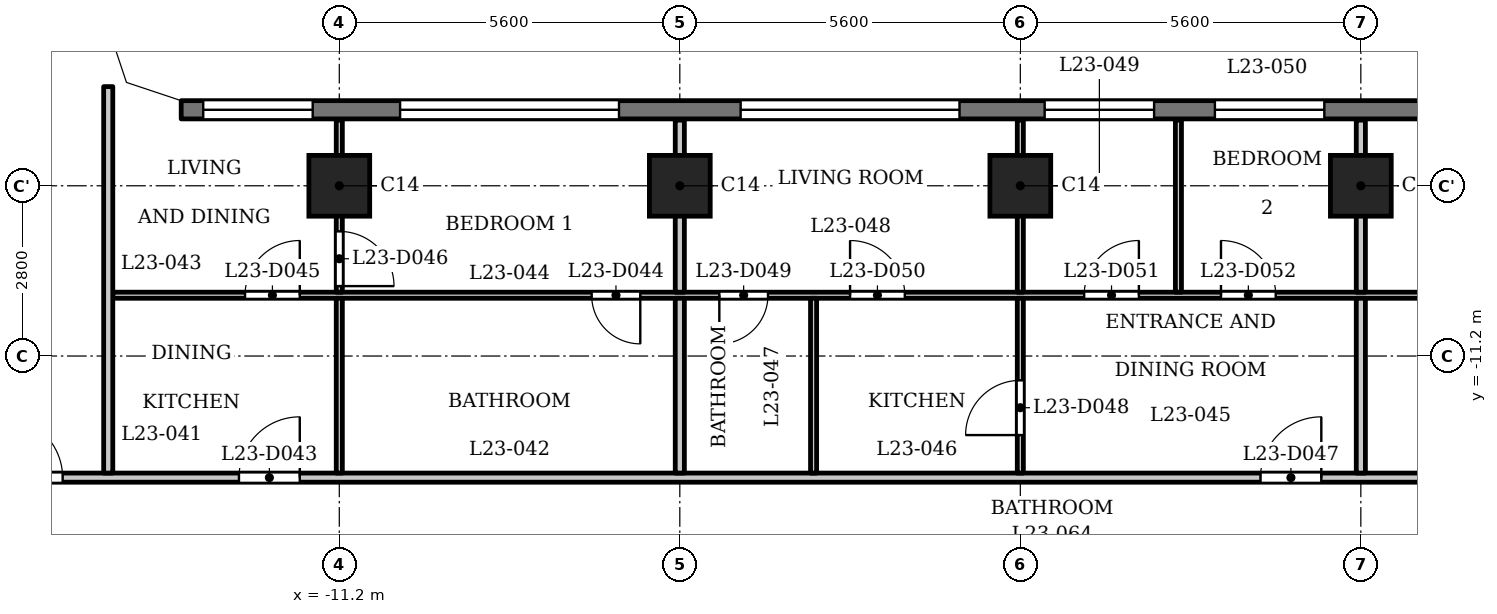
"""IFC4 building model, lengths in metres.
Left out: names, types, materials, properties, quantities, classifications, styles, units other than length and angle.
Written with IfcOpenShell. Run it as: python <this file> out.ifc"""

import sys

from ifc_helpers import new_model, si_unit, direction, frame, frame_2d, origin, origin_2d, place, context, subcontext, project, spatial, polyline, rectangle, outline, extrude, element, fill, save


model = new_model("IFC4")
c1 = context("Model", 3, precision=1e-05, world=origin(), true_north=direction((0.0, 1.0)))
c2 = subcontext(c1, "Body", "Model", "MODEL_VIEW")
j1 = project(units=[si_unit("LENGTHUNIT", "METRE"), si_unit("PLANEANGLEUNIT", "RADIAN")], contexts=[c1])
p1 = place(None, origin())
s1 = spatial("IfcSite", under=j1, at=p1, CompositionType="ELEMENT")
p2 = place(p1, origin())
s2 = spatial("IfcBuilding", under=s1, at=p2, CompositionType="ELEMENT")
p3 = place(p2, frame((0.0, 0.0, 93.8)))
s3 = spatial("IfcBuildingStorey", under=s2, at=p3, CompositionType="ELEMENT", Elevation=93.8)
for number, where, z_axis, x_axis in (
    (1, (-11.2, -8.4, 0.0), (0.0, 0.0, 1.0), (1.0, 0.0, 0.0)),
    (2, (-5.6, -8.4, 0.0), (0.0, 0.0, 1.0), (1.0, 0.0, 0.0)),
    (3, (0.0, -8.4, 0.0), (0.0, 0.0, 1.0), (1.0, 0.0, 0.0)),
    (4, (5.6, -8.4, 0.0), (0.0, 0.0, 1.0), (1.0, 0.0, 0.0)),
):
    element("IfcColumn", number, at=place(p3, frame(where, z_axis=z_axis, x_axis=x_axis)), inside=s3, PredefinedType="COLUMN", context=c2, shape_type="SweptSolid", body=[
        extrude(rectangle(XDim=1.0, YDim=1.0, at=origin_2d()), origin(), (0.0, 0.0, 1.0), 3.5),
    ])
p4 = place(p3, frame((13.8, -7.15, 0.0), z_axis=(0.0, 0.0, 1.0), x_axis=(-1.0, 0.0, 0.0)))
e5 = element("IfcWall", 5, at=p4, inside=s3, PredefinedType="SOLIDWALL", context=c2, shape_type="SweptSolid", body=[
    extrude(rectangle(XDim=27.6, YDim=0.3, at=frame_2d((13.8, 0.0))), origin(), (0.0, 0.0, 1.0), 3.2),
])
p5 = place(p4, frame((0.363, 0.0, 0.9)))
e6 = element("IfcOpeningElement", 6, at=p5, cuts=e5, PredefinedType="OPENING", context=c2, shape_type="SweptSolid", body=[
    extrude(rectangle(XDim=1.8, YDim=1.25, at=frame_2d((0.9, 0.625))), frame((0.0, 0.16, 0.0), z_axis=(0.0, -1.0, 0.0), x_axis=(1.0, 0.0, 0.0)), (0.0, 0.0, 1.0), 0.32),
])
p6 = place(p4, frame((3.6, 0.0, 1.2)))
e7 = element("IfcOpeningElement", 7, at=p6, cuts=e5, PredefinedType="OPENING", context=c2, shape_type="SweptSolid", body=[
    extrude(rectangle(XDim=3.6, YDim=0.95, at=frame_2d((1.8, 0.475))), frame((0.0, 0.16, 0.0), z_axis=(0.0, -1.0, 0.0), x_axis=(1.0, 0.0, 0.0)), (0.0, 0.0, 1.0), 0.32),
])
p7 = place(p4, frame((8.8, 0.0, 0.9)))
e8 = element("IfcOpeningElement", 8, at=p7, cuts=e5, PredefinedType="OPENING", context=c2, shape_type="SweptSolid", body=[
    extrude(rectangle(XDim=1.8, YDim=1.25, at=frame_2d((0.9, 0.625))), frame((0.0, 0.16, 0.0), z_axis=(0.0, -1.0, 0.0), x_axis=(1.0, 0.0, 0.0)), (0.0, 0.0, 1.0), 0.32),
])
p8 = place(p4, frame((11.6, 0.0, 0.9)))
e9 = element("IfcOpeningElement", 9, at=p8, cuts=e5, PredefinedType="OPENING", context=c2, shape_type="SweptSolid", body=[
    extrude(rectangle(XDim=1.8, YDim=1.25, at=frame_2d((0.9, 0.625))), frame((0.0, 0.16, 0.0), z_axis=(0.0, -1.0, 0.0), x_axis=(1.0, 0.0, 0.0)), (0.0, 0.0, 1.0), 0.32),
])
p9 = place(p4, frame((14.8, 0.0, 1.2)))
e10 = element("IfcOpeningElement", 10, at=p9, cuts=e5, PredefinedType="OPENING", context=c2, shape_type="SweptSolid", body=[
    extrude(rectangle(XDim=3.6, YDim=0.95, at=frame_2d((1.8, 0.475))), frame((0.0, 0.16, 0.0), z_axis=(0.0, -1.0, 0.0), x_axis=(1.0, 0.0, 0.0)), (0.0, 0.0, 1.0), 0.32),
])
p10 = place(p4, frame((20.4, 0.0, 1.2)))
e11 = element("IfcOpeningElement", 11, at=p10, cuts=e5, PredefinedType="OPENING", context=c2, shape_type="SweptSolid", body=[
    extrude(rectangle(XDim=3.6, YDim=0.95, at=frame_2d((1.8, 0.475))), frame((0.0, 0.16, 0.0), z_axis=(0.0, -1.0, 0.0), x_axis=(1.0, 0.0, 0.0)), (0.0, 0.0, 1.0), 0.32),
])
p11 = place(p4, frame((25.438, 0.0, 0.9)))
e12 = element("IfcOpeningElement", 12, at=p11, cuts=e5, PredefinedType="OPENING", context=c2, shape_type="SweptSolid", body=[
    extrude(rectangle(XDim=1.8, YDim=1.25, at=frame_2d((0.9, 0.625))), frame((0.0, 0.16, 0.0), z_axis=(0.0, -1.0, 0.0), x_axis=(1.0, 0.0, 0.0)), (0.0, 0.0, 1.0), 0.32),
])
p12 = place(p3, frame((-17.4, -13.2, 0.0), z_axis=(0.0, 0.0, 1.0), x_axis=(1.0, 0.0, 0.0)))
e13 = element("IfcWall", 13, at=p12, inside=s3, PredefinedType="PARTITIONING", context=c2, shape_type="SweptSolid", body=[
    extrude(rectangle(XDim=34.8, YDim=0.15, at=frame_2d((17.4, 0.0))), origin(), (0.0, 0.0, 1.0), 3.2),
])
p13 = place(p12, frame((0.65, 0.0, 0.0)))
e14 = element("IfcOpeningElement", 14, at=p13, cuts=e13, PredefinedType="OPENING", context=c2, shape_type="SweptSolid", body=[
    extrude(rectangle(XDim=1.0, YDim=2.1, at=frame_2d((0.5, 1.05))), frame((0.0, 0.085, 0.0), z_axis=(0.0, -1.0, 0.0), x_axis=(1.0, 0.0, 0.0)), (0.0, 0.0, 1.0), 0.17),
])
p14 = place(p12, frame((33.05, 0.0, 0.0)))
e15 = element("IfcOpeningElement", 15, at=p14, cuts=e13, PredefinedType="OPENING", context=c2, shape_type="SweptSolid", body=[
    extrude(rectangle(XDim=1.0, YDim=2.1, at=frame_2d((0.5, 1.05))), frame((0.0, 0.085, 0.0), z_axis=(0.0, -1.0, 0.0), x_axis=(1.0, 0.0, 0.0)), (0.0, 0.0, 1.0), 0.17),
])
p15 = place(p12, frame((4.55, 0.0, 0.0)))
e16 = element("IfcOpeningElement", 16, at=p15, cuts=e13, PredefinedType="OPENING", context=c2, shape_type="SweptSolid", body=[
    extrude(rectangle(XDim=1.0, YDim=2.1, at=frame_2d((0.5, 1.05))), frame((0.0, 0.085, 0.0), z_axis=(0.0, -1.0, 0.0), x_axis=(1.0, 0.0, 0.0)), (0.0, 0.0, 1.0), 0.17),
])
p16 = place(p12, frame((21.35, 0.0, 0.0)))
e17 = element("IfcOpeningElement", 17, at=p16, cuts=e13, PredefinedType="OPENING", context=c2, shape_type="SweptSolid", body=[
    extrude(rectangle(XDim=1.0, YDim=2.1, at=frame_2d((0.5, 1.05))), frame((0.0, 0.085, 0.0), z_axis=(0.0, -1.0, 0.0), x_axis=(1.0, 0.0, 0.0)), (0.0, 0.0, 1.0), 0.17),
])
p17 = place(p12, frame((30.75, 0.0, 0.0)))
e18 = element("IfcOpeningElement", 18, at=p17, cuts=e13, PredefinedType="OPENING", context=c2, shape_type="SweptSolid", body=[
    extrude(rectangle(XDim=1.0, YDim=2.1, at=frame_2d((0.5, 1.05))), frame((0.0, 0.085, 0.0), z_axis=(0.0, -1.0, 0.0), x_axis=(1.0, 0.0, 0.0)), (0.0, 0.0, 1.0), 0.17),
])
p18 = place(p3, frame((-14.925, -10.2, 0.0), z_axis=(0.0, 0.0, 1.0), x_axis=(1.0, 0.0, 0.0)))
e19 = element("IfcWall", 19, at=p18, inside=s3, PredefinedType="PARTITIONING", context=c2, shape_type="SweptSolid", body=[
    extrude(rectangle(XDim=29.85, YDim=0.1, at=frame_2d((14.925, 0.0))), origin(), (0.0, 0.0, 1.0), 3.2),
])
p19 = place(p18, frame((7.875, 0.0, 0.0)))
e20 = element("IfcOpeningElement", 20, at=p19, cuts=e19, PredefinedType="OPENING", context=c2, shape_type="SweptSolid", body=[
    extrude(rectangle(XDim=0.8, YDim=2.1, at=frame_2d((0.4, 1.05))), frame((0.0, 0.06, 0.0), z_axis=(0.0, -1.0, 0.0), x_axis=(1.0, 0.0, 0.0)), (0.0, 0.0, 1.0), 0.12),
])
p20 = place(p18, frame((2.175, 0.0, 0.0)))
e21 = element("IfcOpeningElement", 21, at=p20, cuts=e19, PredefinedType="OPENING", context=c2, shape_type="SweptSolid", body=[
    extrude(rectangle(XDim=0.9, YDim=2.1, at=frame_2d((0.45, 1.05))), frame((0.0, 0.06, 0.0), z_axis=(0.0, -1.0, 0.0), x_axis=(1.0, 0.0, 0.0)), (0.0, 0.0, 1.0), 0.12),
])
p21 = place(p18, frame((9.975, 0.0, 0.0)))
e22 = element("IfcOpeningElement", 22, at=p21, cuts=e19, PredefinedType="OPENING", context=c2, shape_type="SweptSolid", body=[
    extrude(rectangle(XDim=0.8, YDim=2.1, at=frame_2d((0.4, 1.05))), frame((0.0, 0.06, 0.0), z_axis=(0.0, -1.0, 0.0), x_axis=(1.0, 0.0, 0.0)), (0.0, 0.0, 1.0), 0.12),
])
p22 = place(p18, frame((12.125, 0.0, 0.0)))
e23 = element("IfcOpeningElement", 23, at=p22, cuts=e19, PredefinedType="OPENING", context=c2, shape_type="SweptSolid", body=[
    extrude(rectangle(XDim=0.9, YDim=2.1, at=frame_2d((0.45, 1.05))), frame((0.0, 0.06, 0.0), z_axis=(0.0, -1.0, 0.0), x_axis=(1.0, 0.0, 0.0)), (0.0, 0.0, 1.0), 0.12),
])
p23 = place(p18, frame((15.975, 0.0, 0.0)))
e24 = element("IfcOpeningElement", 24, at=p23, cuts=e19, PredefinedType="OPENING", context=c2, shape_type="SweptSolid", body=[
    extrude(rectangle(XDim=0.9, YDim=2.1, at=frame_2d((0.45, 1.05))), frame((0.0, 0.06, 0.0), z_axis=(0.0, -1.0, 0.0), x_axis=(1.0, 0.0, 0.0)), (0.0, 0.0, 1.0), 0.12),
])
p24 = place(p18, frame((18.225, 0.0, 0.0)))
e25 = element("IfcOpeningElement", 25, at=p24, cuts=e19, PredefinedType="OPENING", context=c2, shape_type="SweptSolid", body=[
    extrude(rectangle(XDim=0.9, YDim=2.1, at=frame_2d((0.45, 1.05))), frame((0.0, 0.06, 0.0), z_axis=(0.0, -1.0, 0.0), x_axis=(1.0, 0.0, 0.0)), (0.0, 0.0, 1.0), 0.12),
])
p25 = place(p18, frame((24.675, 0.0, 0.0)))
e26 = element("IfcOpeningElement", 26, at=p25, cuts=e19, PredefinedType="OPENING", context=c2, shape_type="SweptSolid", body=[
    extrude(rectangle(XDim=0.8, YDim=2.1, at=frame_2d((0.4, 1.05))), frame((0.0, 0.06, 0.0), z_axis=(0.0, -1.0, 0.0), x_axis=(1.0, 0.0, 0.0)), (0.0, 0.0, 1.0), 0.12),
])
p26 = place(p18, frame((28.375, 0.0, 0.0)))
e27 = element("IfcOpeningElement", 27, at=p26, cuts=e19, PredefinedType="OPENING", context=c2, shape_type="SweptSolid", body=[
    extrude(rectangle(XDim=0.9, YDim=2.1, at=frame_2d((0.45, 1.05))), frame((0.0, 0.06, 0.0), z_axis=(0.0, -1.0, 0.0), x_axis=(1.0, 0.0, 0.0)), (0.0, 0.0, 1.0), 0.12),
])
p27 = place(p3, frame((-15.0, -13.125, 0.0), z_axis=(0.0, 0.0, 1.0), x_axis=(0.0, 1.0, 0.0)))
e28 = element("IfcWall", 28, at=p27, inside=s3, PredefinedType="PARTITIONING", context=c2, shape_type="SweptSolid", body=[
    extrude(rectangle(XDim=6.356, YDim=0.15, at=frame_2d((3.178, 0.0))), origin(), (0.0, 0.0, 1.0), 3.2),
])
p28 = place(p3, frame((-11.2, -13.125, 0.0), z_axis=(0.0, 0.0, 1.0), x_axis=(0.0, 1.0, 0.0)))
e29 = element("IfcWall", 29, at=p28, inside=s3, PredefinedType="PARTITIONING", context=c2, shape_type="SweptSolid", body=[
    extrude(rectangle(XDim=2.875, YDim=0.1, at=frame_2d((1.438, 0.0))), origin(), (0.0, 0.0, 1.0), 3.2),
])
p29 = place(p3, frame((-11.2, -10.15, 0.0), z_axis=(0.0, 0.0, 1.0), x_axis=(0.0, 1.0, 0.0)))
e30 = element("IfcWall", 30, at=p29, inside=s3, PredefinedType="PARTITIONING", context=c2, shape_type="SweptSolid", body=[
    extrude(rectangle(XDim=2.83, YDim=0.1, at=frame_2d((1.415, 0.0))), origin(), (0.0, 0.0, 1.0), 3.2),
])
p30 = place(p29, frame((0.1, 0.0, 0.0)))
e31 = element("IfcOpeningElement", 31, at=p30, cuts=e30, PredefinedType="OPENING", context=c2, shape_type="SweptSolid", body=[
    extrude(rectangle(XDim=0.9, YDim=2.1, at=frame_2d((0.45, 1.05))), frame((0.0, 0.06, 0.0), z_axis=(0.0, -1.0, 0.0), x_axis=(1.0, 0.0, 0.0)), (0.0, 0.0, 1.0), 0.12),
])
p31 = place(p3, frame((-5.6, -13.125, 0.0), z_axis=(0.0, 0.0, 1.0), x_axis=(0.0, 1.0, 0.0)))
e32 = element("IfcWall", 32, at=p31, inside=s3, PredefinedType="PARTITIONING", context=c2, shape_type="SweptSolid", body=[
    extrude(rectangle(XDim=2.875, YDim=0.15, at=frame_2d((1.438, 0.0))), origin(), (0.0, 0.0, 1.0), 3.2),
])
p32 = place(p3, frame((-5.6, -10.15, 0.0), z_axis=(0.0, 0.0, 1.0), x_axis=(0.0, 1.0, 0.0)))
e33 = element("IfcWall", 33, at=p32, inside=s3, PredefinedType="PARTITIONING", context=c2, shape_type="SweptSolid", body=[
    extrude(rectangle(XDim=2.83, YDim=0.15, at=frame_2d((1.415, 0.0))), origin(), (0.0, 0.0, 1.0), 3.2),
])
p33 = place(p3, frame((-3.4, -13.125, 0.0), z_axis=(0.0, 0.0, 1.0), x_axis=(0.0, 1.0, 0.0)))
e34 = element("IfcWall", 34, at=p33, inside=s3, PredefinedType="PARTITIONING", context=c2, shape_type="SweptSolid", body=[
    extrude(rectangle(XDim=2.875, YDim=0.1, at=frame_2d((1.438, 0.0))), origin(), (0.0, 0.0, 1.0), 3.2),
])
p34 = place(p3, frame((0.0, -13.125, 0.0), z_axis=(0.0, 0.0, 1.0), x_axis=(0.0, 1.0, 0.0)))
e35 = element("IfcWall", 35, at=p34, inside=s3, PredefinedType="PARTITIONING", context=c2, shape_type="SweptSolid", body=[
    extrude(rectangle(XDim=2.875, YDim=0.1, at=frame_2d((1.438, 0.0))), origin(), (0.0, 0.0, 1.0), 3.2),
])
p35 = place(p34, frame((0.625, 0.0, 0.0)))
e36 = element("IfcOpeningElement", 36, at=p35, cuts=e35, PredefinedType="OPENING", context=c2, shape_type="SweptSolid", body=[
    extrude(rectangle(XDim=0.9, YDim=2.1, at=frame_2d((0.45, 1.05))), frame((0.0, 0.06, 0.0), z_axis=(0.0, -1.0, 0.0), x_axis=(1.0, 0.0, 0.0)), (0.0, 0.0, 1.0), 0.12),
])
for number, where, z_axis, x_axis in (
    (37, (0.0, -10.15, 0.0), (0.0, 0.0, 1.0), (0.0, 1.0, 0.0)),
    (38, (2.6, -10.15, 0.0), (0.0, 0.0, 1.0), (0.0, 1.0, 0.0)),
):
    element("IfcWall", number, at=place(p3, frame(where, z_axis=z_axis, x_axis=x_axis)), inside=s3, PredefinedType="PARTITIONING", context=c2, shape_type="SweptSolid", body=[
        extrude(rectangle(XDim=2.83, YDim=0.1, at=frame_2d((1.415, 0.0))), origin(), (0.0, 0.0, 1.0), 3.2),
    ])
p36 = place(p3, frame((5.6, -13.125, 0.0), z_axis=(0.0, 0.0, 1.0), x_axis=(0.0, 1.0, 0.0)))
e39 = element("IfcWall", 39, at=p36, inside=s3, PredefinedType="PARTITIONING", context=c2, shape_type="SweptSolid", body=[
    extrude(rectangle(XDim=2.875, YDim=0.15, at=frame_2d((1.438, 0.0))), origin(), (0.0, 0.0, 1.0), 3.2),
])
p37 = place(p3, frame((5.6, -10.15, 0.0), z_axis=(0.0, 0.0, 1.0), x_axis=(0.0, 1.0, 0.0)))
e40 = element("IfcWall", 40, at=p37, inside=s3, PredefinedType="PARTITIONING", context=c2, shape_type="SweptSolid", body=[
    extrude(rectangle(XDim=2.83, YDim=0.15, at=frame_2d((1.415, 0.0))), origin(), (0.0, 0.0, 1.0), 3.2),
])
p38 = place(p3, origin())
e41 = element("IfcWall", 41, at=p38, inside=s3, PredefinedType="SOLIDWALL", context=c2, shape_type="SweptSolid", body=[
    extrude(outline(polyline([(-14.937, -6.937), (-13.849, -7.3), (-13.8, -7.3), (-13.8, -7.0), (-14.7, -6.7), (-15.0, -5.8), (-15.3, -5.8), (-15.3, -5.849), (-14.937, -6.937)])), origin(), (0.0, 0.0, 1.0), 3.2),
])
p39 = place(p13, origin())
e42 = element("IfcDoor", 42, at=p39, inside=s3, OperationType="SINGLE_SWING_RIGHT", PredefinedType="DOOR", context=c2, shape_type="SweptSolid", body=[
    extrude(rectangle(XDim=1.0, YDim=2.1, at=frame_2d((0.5, 1.05))), frame((0.0, 0.025, 0.0), z_axis=(0.0, -1.0, 0.0), x_axis=(1.0, 0.0, 0.0)), (0.0, 0.0, 1.0), 0.05),
])
fill(e14, e42)
p40 = place(p15, origin())
e43 = element("IfcDoor", 43, at=p40, inside=s3, OperationType="SINGLE_SWING_LEFT", PredefinedType="DOOR", context=c2, shape_type="SweptSolid", body=[
    extrude(rectangle(XDim=1.0, YDim=2.1, at=frame_2d((0.5, 1.05))), frame((0.0, 0.025, 0.0), z_axis=(0.0, -1.0, 0.0), x_axis=(1.0, 0.0, 0.0)), (0.0, 0.0, 1.0), 0.05),
])
fill(e16, e43)
p41 = place(p19, origin())
e44 = element("IfcDoor", 44, at=p41, inside=s3, OperationType="SINGLE_SWING_RIGHT", PredefinedType="DOOR", context=c2, shape_type="SweptSolid", body=[
    extrude(rectangle(XDim=0.8, YDim=2.1, at=frame_2d((0.4, 1.05))), frame((0.0, 0.025, 0.0), z_axis=(0.0, -1.0, 0.0), x_axis=(1.0, 0.0, 0.0)), (0.0, 0.0, 1.0), 0.05),
])
fill(e20, e44)
p42 = place(p20, origin())
e45 = element("IfcDoor", 45, at=p42, inside=s3, OperationType="SINGLE_SWING_LEFT", PredefinedType="DOOR", context=c2, shape_type="SweptSolid", body=[
    extrude(rectangle(XDim=0.9, YDim=2.1, at=frame_2d((0.45, 1.05))), frame((0.0, 0.025, 0.0), z_axis=(0.0, -1.0, 0.0), x_axis=(1.0, 0.0, 0.0)), (0.0, 0.0, 1.0), 0.05),
])
fill(e21, e45)
p43 = place(p30, origin())
e46 = element("IfcDoor", 46, at=p43, inside=s3, OperationType="SINGLE_SWING_LEFT", PredefinedType="DOOR", context=c2, shape_type="SweptSolid", body=[
    extrude(rectangle(XDim=0.9, YDim=2.1, at=frame_2d((0.45, 1.05))), frame((0.0, 0.025, 0.0), z_axis=(0.0, -1.0, 0.0), x_axis=(1.0, 0.0, 0.0)), (0.0, 0.0, 1.0), 0.05),
])
fill(e31, e46)
p44 = place(p16, origin())
e47 = element("IfcDoor", 47, at=p44, inside=s3, OperationType="SINGLE_SWING_LEFT", PredefinedType="DOOR", context=c2, shape_type="SweptSolid", body=[
    extrude(rectangle(XDim=1.0, YDim=2.1, at=frame_2d((0.5, 1.05))), frame((0.0, 0.025, 0.0), z_axis=(0.0, -1.0, 0.0), x_axis=(1.0, 0.0, 0.0)), (0.0, 0.0, 1.0), 0.05),
])
fill(e17, e47)
p45 = place(p35, origin())
e48 = element("IfcDoor", 48, at=p45, inside=s3, OperationType="SINGLE_SWING_RIGHT", PredefinedType="DOOR", context=c2, shape_type="SweptSolid", body=[
    extrude(rectangle(XDim=0.9, YDim=2.1, at=frame_2d((0.45, 1.05))), frame((0.0, 0.025, 0.0), z_axis=(0.0, -1.0, 0.0), x_axis=(1.0, 0.0, 0.0)), (0.0, 0.0, 1.0), 0.05),
])
fill(e36, e48)
p46 = place(p21, origin())
e49 = element("IfcDoor", 49, at=p46, inside=s3, OperationType="SINGLE_SWING_LEFT", PredefinedType="DOOR", context=c2, shape_type="SweptSolid", body=[
    extrude(rectangle(XDim=0.8, YDim=2.1, at=frame_2d((0.4, 1.05))), frame((0.0, 0.025, 0.0), z_axis=(0.0, -1.0, 0.0), x_axis=(1.0, 0.0, 0.0)), (0.0, 0.0, 1.0), 0.05),
])
fill(e22, e49)
p47 = place(p22, origin())
e50 = element("IfcDoor", 50, at=p47, inside=s3, OperationType="SINGLE_SWING_RIGHT", PredefinedType="DOOR", context=c2, shape_type="SweptSolid", body=[
    extrude(rectangle(XDim=0.9, YDim=2.1, at=frame_2d((0.45, 1.05))), frame((0.0, 0.025, 0.0), z_axis=(0.0, -1.0, 0.0), x_axis=(1.0, 0.0, 0.0)), (0.0, 0.0, 1.0), 0.05),
])
fill(e23, e50)
p48 = place(p23, origin())
e51 = element("IfcDoor", 51, at=p48, inside=s3, OperationType="SINGLE_SWING_LEFT", PredefinedType="DOOR", context=c2, shape_type="SweptSolid", body=[
    extrude(rectangle(XDim=0.9, YDim=2.1, at=frame_2d((0.45, 1.05))), frame((0.0, 0.025, 0.0), z_axis=(0.0, -1.0, 0.0), x_axis=(1.0, 0.0, 0.0)), (0.0, 0.0, 1.0), 0.05),
])
fill(e24, e51)
p49 = place(p24, origin())
e52 = element("IfcDoor", 52, at=p49, inside=s3, OperationType="SINGLE_SWING_RIGHT", PredefinedType="DOOR", context=c2, shape_type="SweptSolid", body=[
    extrude(rectangle(XDim=0.9, YDim=2.1, at=frame_2d((0.45, 1.05))), frame((0.0, 0.025, 0.0), z_axis=(0.0, -1.0, 0.0), x_axis=(1.0, 0.0, 0.0)), (0.0, 0.0, 1.0), 0.05),
])
fill(e25, e52)
p50 = place(p7, origin())
e53 = element("IfcWindow", 53, at=p50, inside=s3, PartitioningType="SINGLE_PANEL", PredefinedType="WINDOW", context=c2, shape_type="SweptSolid", body=[
    extrude(rectangle(XDim=1.8, YDim=1.25, at=frame_2d((0.9, 0.625))), frame((0.0, 0.03, 0.0), z_axis=(0.0, -1.0, 0.0), x_axis=(1.0, 0.0, 0.0)), (0.0, 0.0, 1.0), 0.06),
])
fill(e8, e53)
p51 = place(p8, origin())
e54 = element("IfcWindow", 54, at=p51, inside=s3, PartitioningType="SINGLE_PANEL", PredefinedType="WINDOW", context=c2, shape_type="SweptSolid", body=[
    extrude(rectangle(XDim=1.8, YDim=1.25, at=frame_2d((0.9, 0.625))), frame((0.0, 0.03, 0.0), z_axis=(0.0, -1.0, 0.0), x_axis=(1.0, 0.0, 0.0)), (0.0, 0.0, 1.0), 0.06),
])
fill(e9, e54)
p52 = place(p9, origin())
e55 = element("IfcWindow", 55, at=p52, inside=s3, PartitioningType="SINGLE_PANEL", PredefinedType="WINDOW", context=c2, shape_type="SweptSolid", body=[
    extrude(rectangle(XDim=3.6, YDim=0.95, at=frame_2d((1.8, 0.475))), frame((0.0, 0.03, 0.0), z_axis=(0.0, -1.0, 0.0), x_axis=(1.0, 0.0, 0.0)), (0.0, 0.0, 1.0), 0.06),
])
fill(e10, e55)
p53 = place(p10, origin())
e56 = element("IfcWindow", 56, at=p53, inside=s3, PartitioningType="SINGLE_PANEL", PredefinedType="WINDOW", context=c2, shape_type="SweptSolid", body=[
    extrude(rectangle(XDim=3.6, YDim=0.95, at=frame_2d((1.8, 0.475))), frame((0.0, 0.03, 0.0), z_axis=(0.0, -1.0, 0.0), x_axis=(1.0, 0.0, 0.0)), (0.0, 0.0, 1.0), 0.06),
])
fill(e11, e56)
p54 = place(p11, origin())
e57 = element("IfcWindow", 57, at=p54, inside=s3, PartitioningType="SINGLE_PANEL", PredefinedType="WINDOW", context=c2, shape_type="SweptSolid", body=[
    extrude(rectangle(XDim=1.8, YDim=1.25, at=frame_2d((0.9, 0.625))), frame((0.0, 0.03, 0.0), z_axis=(0.0, -1.0, 0.0), x_axis=(1.0, 0.0, 0.0)), (0.0, 0.0, 1.0), 0.06),
])
fill(e12, e57)
save(model, sys.argv[1])
